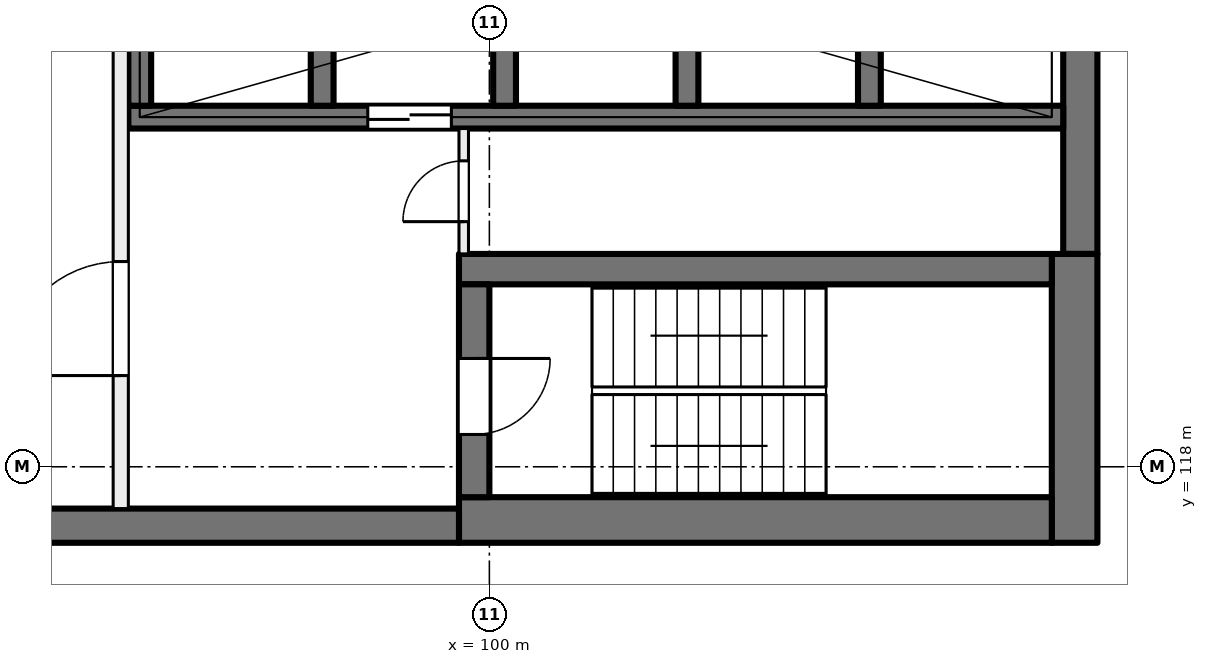
"""IFC4 building model, lengths in metres.
Left out: names, types, materials, properties, quantities, classifications, styles, units other than length and angle.
Written with IfcOpenShell. Run it as: python <this file> out.ifc"""

import sys

from ifc_helpers import new_model, si_unit, direction, frame, frame_2d, origin, place, context, subcontext, project, spatial, rectangle, extrude, element, fill, save


model = new_model("IFC4")
c1 = context("Model", 3, precision=1e-05, world=origin(), true_north=direction((0.0, 1.0)))
c2 = subcontext(c1, "Body", "Model", "MODEL_VIEW")
j1 = project(units=[si_unit("LENGTHUNIT", "METRE"), si_unit("PLANEANGLEUNIT", "RADIAN")], contexts=[c1])
p1 = place(None, origin())
s1 = spatial("IfcSite", under=j1, at=p1, CompositionType="ELEMENT")
p2 = place(p1, origin())
s2 = spatial("IfcBuilding", under=s1, at=p2, CompositionType="ELEMENT")
p3 = place(p2, frame((0.0, 0.0, 257.5)))
s3 = spatial("IfcBuildingStorey", under=s2, at=p3, CompositionType="ELEMENT", Elevation=257.5)
p4 = place(p3, frame((107.775, 135.2, 0.0), z_axis=(0.0, 0.0, 1.0), x_axis=(0.0, -1.0, 0.0)))
e1 = element("IfcWall", 1, at=p4, inside=s3, PredefinedType="SHEAR", context=c2, shape_type="SweptSolid", body=[
    extrude(rectangle(XDim=14.4, YDim=0.45, at=frame_2d((7.2, 0.0))), origin(), (0.0, 0.0, 1.0), 4.0),
])
p5 = place(p3, frame((107.7, 120.8, 0.0), z_axis=(0.0, 0.0, 1.0), x_axis=(0.0, -1.0, 0.0)))
e2 = element("IfcWall", 2, at=p5, inside=s3, PredefinedType="SHEAR", context=c2, shape_type="SweptSolid", body=[
    extrude(rectangle(XDim=3.8, YDim=0.6, at=frame_2d((1.9, 0.0))), origin(), (0.0, 0.0, 1.0), 4.0),
])
p6 = place(p3, frame((107.4, 117.3, 0.0), z_axis=(0.0, 0.0, 1.0), x_axis=(-1.0, 0.0, 0.0)))
e3 = element("IfcWall", 3, at=p6, inside=s3, PredefinedType="SHEAR", context=c2, shape_type="SweptSolid", body=[
    extrude(rectangle(XDim=7.8, YDim=0.6, at=frame_2d((3.9, 0.0))), origin(), (0.0, 0.0, 1.0), 4.0),
])
p7 = place(p3, frame((99.6, 117.225, 0.0), z_axis=(0.0, 0.0, 1.0), x_axis=(-1.0, 0.0, 0.0)))
e4 = element("IfcWall", 4, at=p7, inside=s3, PredefinedType="SHEAR", context=c2, shape_type="SweptSolid", body=[
    extrude(rectangle(XDim=9.0, YDim=0.45, at=frame_2d((4.5, 0.0))), origin(), (0.0, 0.0, 1.0), 4.0),
])
p8 = place(p3, frame((107.4, 120.6, 0.0), z_axis=(0.0, 0.0, 1.0), x_axis=(-1.0, 0.0, 0.0)))
e5 = element("IfcWall", 5, at=p8, inside=s3, PredefinedType="SHEAR", context=c2, shape_type="SweptSolid", body=[
    extrude(rectangle(XDim=7.8, YDim=0.4, at=frame_2d((3.9, 0.0))), origin(), (0.0, 0.0, 1.0), 4.0),
])
p9 = place(p3, frame((99.8, 120.4, 0.0), z_axis=(0.0, 0.0, 1.0), x_axis=(0.0, -1.0, 0.0)))
e6 = element("IfcWall", 6, at=p9, inside=s3, PredefinedType="SHEAR", context=c2, shape_type="SweptSolid", body=[
    extrude(rectangle(XDim=2.8, YDim=0.4, at=frame_2d((1.4, 0.0))), origin(), (0.0, 0.0, 1.0), 4.0),
])
p10 = place(p9, frame((0.975, 0.0, 0.0)))
e7 = element("IfcOpeningElement", 7, at=p10, cuts=e6, PredefinedType="OPENING", context=c2, shape_type="SweptSolid", body=[
    extrude(rectangle(XDim=1.0, YDim=2.1, at=frame_2d((0.5, 1.05))), frame((0.0, 0.21, 0.0), z_axis=(0.0, -1.0, 0.0), x_axis=(1.0, 0.0, 0.0)), (0.0, 0.0, 1.0), 0.42),
])
p11 = place(p3, frame((107.55, 122.6, 0.0), z_axis=(0.0, 0.0, 1.0), x_axis=(-1.0, 0.0, 0.0)))
e8 = element("IfcWall", 8, at=p11, inside=s3, PredefinedType="SHEAR", context=c2, shape_type="SweptSolid", body=[
    extrude(rectangle(XDim=12.3, YDim=0.3, at=frame_2d((6.15, 0.0))), origin(), (0.0, 0.0, 1.0), 4.0),
])
p12 = place(p11, frame((8.05, 0.0, 0.0)))
e9 = element("IfcOpeningElement", 9, at=p12, cuts=e8, PredefinedType="OPENING", context=c2, shape_type="SweptSolid", body=[
    extrude(rectangle(XDim=1.1, YDim=2.1, at=frame_2d((0.55, 1.05))), frame((0.0, 0.16, 0.0), z_axis=(0.0, -1.0, 0.0), x_axis=(1.0, 0.0, 0.0)), (0.0, 0.0, 1.0), 0.32),
])
for number, where, z_axis, x_axis in (
    (10, (105.0, 125.85, 0.0), (0.0, 0.0, 1.0), (0.0, -1.0, 0.0)),
    (11, (102.6, 125.85, 0.0), (0.0, 0.0, 1.0), (0.0, -1.0, 0.0)),
    (12, (100.2, 125.85, 0.0), (0.0, 0.0, 1.0), (0.0, -1.0, 0.0)),
    (13, (97.8, 125.85, 0.0), (0.0, 0.0, 1.0), (0.0, -1.0, 0.0)),
    (14, (95.4, 125.85, 0.0), (0.0, 0.0, 1.0), (0.0, -1.0, 0.0)),
):
    element("IfcWall", number, at=place(p3, frame(where, z_axis=z_axis, x_axis=x_axis)), inside=s3, PredefinedType="SHEAR", context=c2, shape_type="SweptSolid", body=[
        extrude(rectangle(XDim=3.1, YDim=0.3, at=frame_2d((1.55, 0.0))), origin(), (0.0, 0.0, 1.0), 4.0),
    ])
p13 = place(p3, frame((95.15, 117.45, 0.0), z_axis=(0.0, 0.0, 1.0), x_axis=(0.0, 1.0, 0.0)))
e15 = element("IfcWall", 15, at=p13, inside=s3, PredefinedType="PARTITIONING", context=c2, shape_type="SweptSolid", body=[
    extrude(rectangle(XDim=8.5, YDim=0.2, at=frame_2d((4.25, 0.0))), origin(), (0.0, 0.0, 1.0), 3.625),
])
p14 = place(p13, frame((1.75, 0.0, 0.0)))
e16 = element("IfcOpeningElement", 16, at=p14, cuts=e15, PredefinedType="OPENING", context=c2, shape_type="SweptSolid", body=[
    extrude(rectangle(XDim=1.5, YDim=2.1, at=frame_2d((0.75, 1.05))), frame((0.0, 0.11, 0.0), z_axis=(0.0, -1.0, 0.0), x_axis=(1.0, 0.0, 0.0)), (0.0, 0.0, 1.0), 0.22),
])
p15 = place(p3, frame((99.663, 120.8, 0.0), z_axis=(0.0, 0.0, 1.0), x_axis=(0.0, 1.0, 0.0)))
e17 = element("IfcWall", 17, at=p15, inside=s3, PredefinedType="PARTITIONING", context=c2, shape_type="SweptSolid", body=[
    extrude(rectangle(XDim=1.65, YDim=0.125, at=frame_2d((0.825, 0.0))), origin(), (0.0, 0.0, 1.0), 3.625),
])
p16 = place(p15, frame((0.425, 0.0, 0.0)))
e18 = element("IfcOpeningElement", 18, at=p16, cuts=e17, PredefinedType="OPENING", context=c2, shape_type="SweptSolid", body=[
    extrude(rectangle(XDim=0.8, YDim=2.1, at=frame_2d((0.4, 1.05))), frame((0.0, 0.073, 0.0), z_axis=(0.0, -1.0, 0.0), x_axis=(1.0, 0.0, 0.0)), (0.0, 0.0, 1.0), 0.145),
])
p17 = place(p14, origin())
e19 = element("IfcDoor", 19, at=p17, inside=s3, OperationType="DOUBLE_DOOR_SINGLE_SWING", PredefinedType="DOOR", context=c2, shape_type="SweptSolid", body=[
    extrude(rectangle(XDim=1.5, YDim=2.1, at=frame_2d((0.75, 1.05))), frame((0.0, 0.025, 0.0), z_axis=(0.0, -1.0, 0.0), x_axis=(1.0, 0.0, 0.0)), (0.0, 0.0, 1.0), 0.05),
])
fill(e16, e19)
p18 = place(p10, origin())
e20 = element("IfcDoor", 20, at=p18, inside=s3, OperationType="SINGLE_SWING_LEFT", PredefinedType="DOOR", context=c2, shape_type="SweptSolid", body=[
    extrude(rectangle(XDim=1.0, YDim=2.1, at=frame_2d((0.5, 1.05))), frame((0.0, 0.025, 0.0), z_axis=(0.0, -1.0, 0.0), x_axis=(1.0, 0.0, 0.0)), (0.0, 0.0, 1.0), 0.05),
])
fill(e7, e20)
p19 = place(p16, origin())
e21 = element("IfcDoor", 21, at=p19, inside=s3, OperationType="SINGLE_SWING_RIGHT", PredefinedType="DOOR", context=c2, shape_type="SweptSolid", body=[
    extrude(rectangle(XDim=0.8, YDim=2.1, at=frame_2d((0.4, 1.05))), frame((0.0, 0.025, 0.0), z_axis=(0.0, -1.0, 0.0), x_axis=(1.0, 0.0, 0.0)), (0.0, 0.0, 1.0), 0.05),
])
fill(e18, e21)
p20 = place(p12, origin())
e22 = element("IfcDoor", 22, at=p20, inside=s3, OperationType="DOUBLE_DOOR_SLIDING", PredefinedType="DOOR", context=c2, shape_type="SweptSolid", body=[
    extrude(rectangle(XDim=1.1, YDim=2.1, at=frame_2d((0.55, 1.05))), frame((0.0, 0.025, 0.0), z_axis=(0.0, -1.0, 0.0), x_axis=(1.0, 0.0, 0.0)), (0.0, 0.0, 1.0), 0.05),
])
fill(e9, e22)
save(model, sys.argv[1])
